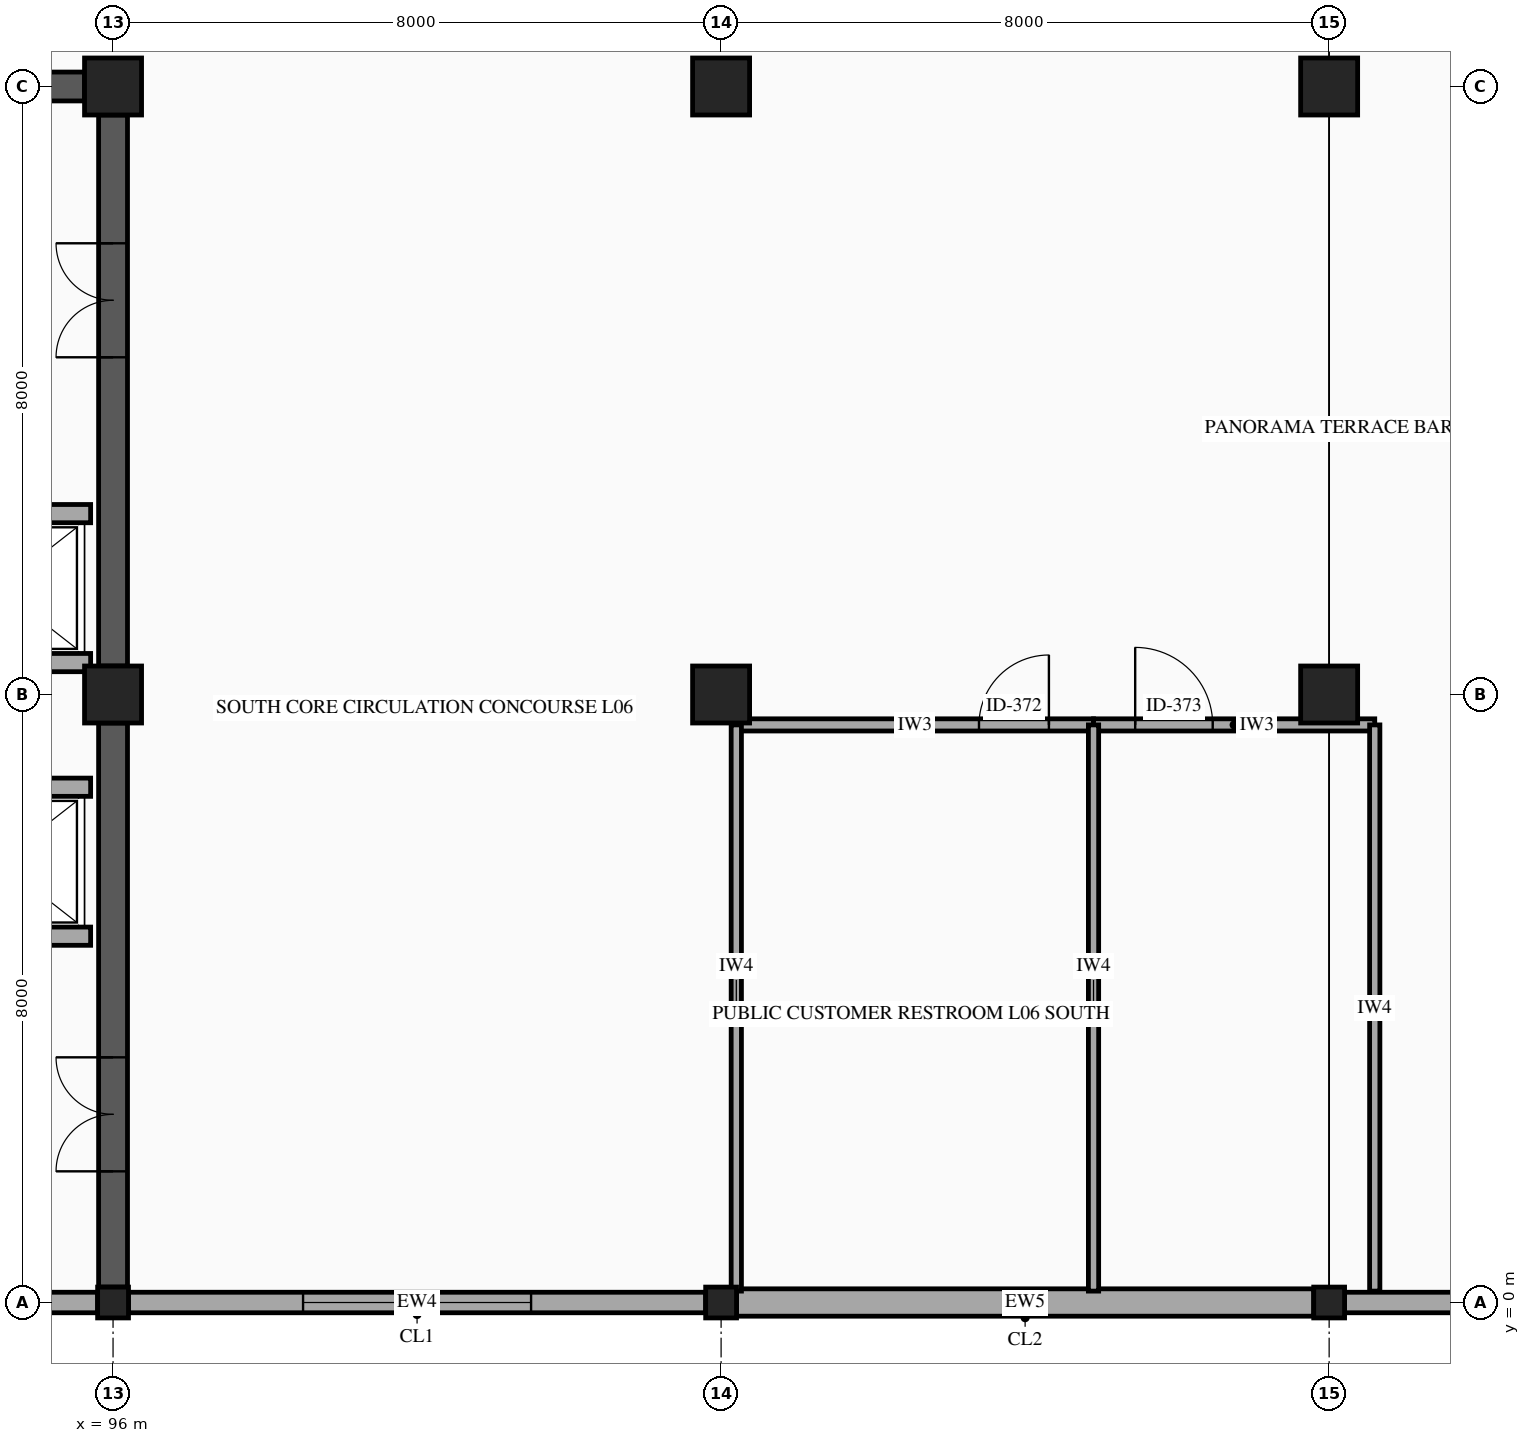
"""IFC4 building model, lengths in metres.
Left out: names, types, materials, properties, quantities, classifications, styles, units other than length and angle.
Written with IfcOpenShell. Run it as: python <this file> out.ifc"""

import sys

from ifc_helpers import new_model, si_unit, direction, frame, frame_2d, origin, origin_2d, place, context, subcontext, project, spatial, rectangle, hollow_rectangle, extrude, element, fill, save


model = new_model("IFC4")
c1 = context("Model", 3, precision=1e-05, world=origin(), true_north=direction((0.0, 1.0)))
c2 = subcontext(c1, "Body", "Model", "MODEL_VIEW")
j1 = project(units=[si_unit("LENGTHUNIT", "METRE"), si_unit("PLANEANGLEUNIT", "RADIAN")], contexts=[c1])
p1 = place(None, origin())
s1 = spatial("IfcSite", under=j1, at=p1, CompositionType="ELEMENT")
p2 = place(p1, origin())
s2 = spatial("IfcBuilding", under=s1, at=p2, CompositionType="ELEMENT")
p3 = place(p2, frame((0.0, 0.0, 28.4)))
s3 = spatial("IfcBuildingStorey", under=s2, at=p3, CompositionType="ELEMENT", Elevation=28.4)
p4 = place(p3, frame((96.0, 0.0, 0.0), z_axis=(0.0, 0.0, 1.0), x_axis=(1.0, 0.0, 0.0)))
e1 = element("IfcColumn", 1, at=p4, inside=s3, PredefinedType="COLUMN", context=c2, shape_type="SweptSolid", body=[
    extrude(hollow_rectangle(XDim=0.406, YDim=0.406, WallThickness=0.015, InnerFilletRadius=0.015, OuterFilletRadius=0.029, at=origin_2d()), origin(), (0.0, 0.0, 1.0), 4.5),
])
for number, where, z_axis, x_axis in (
    (2, (96.0, 8.0, 0.0), (0.0, 0.0, 1.0), (1.0, 0.0, 0.0)),
    (3, (96.0, 16.0, 0.0), (0.0, 0.0, 1.0), (1.0, 0.0, 0.0)),
):
    element("IfcColumn", number, at=place(p3, frame(where, z_axis=z_axis, x_axis=x_axis)), inside=s3, PredefinedType="COLUMN", context=c2, shape_type="SweptSolid", body=[
        extrude(rectangle(XDim=0.75, YDim=0.75, at=origin_2d()), origin(), (0.0, 0.0, 1.0), 4.5),
    ])
p5 = place(p3, frame((104.0, 0.0, 0.0), z_axis=(0.0, 0.0, 1.0), x_axis=(1.0, 0.0, 0.0)))
e4 = element("IfcColumn", 4, at=p5, inside=s3, PredefinedType="COLUMN", context=c2, shape_type="SweptSolid", body=[
    extrude(hollow_rectangle(XDim=0.406, YDim=0.406, WallThickness=0.015, InnerFilletRadius=0.015, OuterFilletRadius=0.029, at=origin_2d()), origin(), (0.0, 0.0, 1.0), 4.5),
])
for number, where, z_axis, x_axis in (
    (5, (104.0, 8.0, 0.0), (0.0, 0.0, 1.0), (1.0, 0.0, 0.0)),
    (6, (104.0, 16.0, 0.0), (0.0, 0.0, 1.0), (1.0, 0.0, 0.0)),
):
    element("IfcColumn", number, at=place(p3, frame(where, z_axis=z_axis, x_axis=x_axis)), inside=s3, PredefinedType="COLUMN", context=c2, shape_type="SweptSolid", body=[
        extrude(rectangle(XDim=0.75, YDim=0.75, at=origin_2d()), origin(), (0.0, 0.0, 1.0), 4.5),
    ])
p6 = place(p3, frame((112.0, 0.0, 0.0), z_axis=(0.0, 0.0, 1.0), x_axis=(1.0, 0.0, 0.0)))
e7 = element("IfcColumn", 7, at=p6, inside=s3, PredefinedType="COLUMN", context=c2, shape_type="SweptSolid", body=[
    extrude(hollow_rectangle(XDim=0.406, YDim=0.406, WallThickness=0.015, InnerFilletRadius=0.015, OuterFilletRadius=0.029, at=origin_2d()), origin(), (0.0, 0.0, 1.0), 4.5),
])
for number, where, z_axis, x_axis in (
    (8, (112.0, 8.0, 0.0), (0.0, 0.0, 1.0), (1.0, 0.0, 0.0)),
    (9, (112.0, 16.0, 0.0), (0.0, 0.0, 1.0), (1.0, 0.0, 0.0)),
):
    element("IfcColumn", number, at=place(p3, frame(where, z_axis=z_axis, x_axis=x_axis)), inside=s3, PredefinedType="COLUMN", context=c2, shape_type="SweptSolid", body=[
        extrude(rectangle(XDim=0.75, YDim=0.75, at=origin_2d()), origin(), (0.0, 0.0, 1.0), 4.5),
    ])
p7 = place(p3, frame((119.797, 0.0, 0.0), z_axis=(0.0, 0.0, 1.0), x_axis=(-1.0, 0.0, 0.0)))
e10 = element("IfcWall", 10, at=p7, inside=s3, PredefinedType="STANDARD", context=c2, shape_type="SweptSolid", body=[
    extrude(rectangle(XDim=7.594, YDim=0.27, at=frame_2d((3.797, 0.0))), origin(), (0.0, 0.0, 1.0), 3.48),
])
p8 = place(p7, frame((2.347, 0.0, 0.8)))
e11 = element("IfcOpeningElement", 11, at=p8, cuts=e10, PredefinedType="OPENING", context=c2, shape_type="SweptSolid", body=[
    extrude(rectangle(XDim=2.9, YDim=2.1, at=frame_2d((1.45, 1.05))), frame((0.0, 0.145, 0.0), z_axis=(0.0, -1.0, 0.0), x_axis=(1.0, 0.0, 0.0)), (0.0, 0.0, 1.0), 0.29),
])
p9 = place(p3, frame((111.797, 0.0, 0.0), z_axis=(0.0, 0.0, 1.0), x_axis=(-1.0, 0.0, 0.0)))
e12 = element("IfcWall", 12, at=p9, inside=s3, PredefinedType="SOLIDWALL", context=c2, shape_type="SweptSolid", body=[
    extrude(rectangle(XDim=7.594, YDim=0.36, at=frame_2d((3.797, 0.0))), origin(), (0.0, 0.0, 1.0), 3.48),
])
p10 = place(p3, frame((103.797, 0.0, 0.0), z_axis=(0.0, 0.0, 1.0), x_axis=(-1.0, 0.0, 0.0)))
e13 = element("IfcWall", 13, at=p10, inside=s3, PredefinedType="STANDARD", context=c2, shape_type="SweptSolid", body=[
    extrude(rectangle(XDim=7.594, YDim=0.27, at=frame_2d((3.797, 0.0))), origin(), (0.0, 0.0, 1.0), 3.48),
])
p11 = place(p10, frame((2.297, 0.0, 0.8)))
e14 = element("IfcOpeningElement", 14, at=p11, cuts=e13, PredefinedType="OPENING", context=c2, shape_type="SweptSolid", body=[
    extrude(rectangle(XDim=3.0, YDim=1.6, at=frame_2d((1.5, 0.8))), frame((0.0, 0.145, 0.0), z_axis=(0.0, -1.0, 0.0), x_axis=(1.0, 0.0, 0.0)), (0.0, 0.0, 1.0), 0.29),
])
p12 = place(p3, frame((95.797, 0.0, 0.0), z_axis=(0.0, 0.0, 1.0), x_axis=(-1.0, 0.0, 0.0)))
e15 = element("IfcWall", 15, at=p12, inside=s3, PredefinedType="STANDARD", context=c2, shape_type="SweptSolid", body=[
    extrude(rectangle(XDim=7.594, YDim=0.27, at=frame_2d((3.797, 0.0))), origin(), (0.0, 0.0, 1.0), 3.48),
])
p13 = place(p3, frame((88.375, 16.0, 0.0), z_axis=(0.0, 0.0, 1.0), x_axis=(1.0, 0.0, 0.0)))
e16 = element("IfcWall", 16, at=p13, inside=s3, PredefinedType="SHEAR", context=c2, shape_type="SweptSolid", body=[
    extrude(rectangle(XDim=7.25, YDim=0.38, at=frame_2d((3.625, 0.0))), origin(), (0.0, 0.0, 1.0), 4.28),
])
p14 = place(p13, frame((2.875, 0.0, 0.0)))
e17 = element("IfcOpeningElement", 17, at=p14, cuts=e16, PredefinedType="OPENING", context=c2, shape_type="SweptSolid", body=[
    extrude(rectangle(XDim=1.5, YDim=2.15, at=frame_2d((0.75, 1.075))), frame((0.0, 0.2, 0.0), z_axis=(0.0, -1.0, 0.0), x_axis=(1.0, 0.0, 0.0)), (0.0, 0.0, 1.0), 0.4),
])
p15 = place(p3, frame((96.0, 0.203, 0.0), z_axis=(0.0, 0.0, 1.0), x_axis=(0.0, 1.0, 0.0)))
e18 = element("IfcWall", 18, at=p15, inside=s3, PredefinedType="SHEAR", context=c2, shape_type="SweptSolid", body=[
    extrude(rectangle(XDim=7.422, YDim=0.38, at=frame_2d((3.711, 0.0))), origin(), (0.0, 0.0, 1.0), 4.28),
])
p16 = place(p15, frame((1.523, 0.0, 0.0)))
e19 = element("IfcOpeningElement", 19, at=p16, cuts=e18, PredefinedType="OPENING", context=c2, shape_type="SweptSolid", body=[
    extrude(rectangle(XDim=1.5, YDim=2.15, at=frame_2d((0.75, 1.075))), frame((0.0, 0.2, 0.0), z_axis=(0.0, -1.0, 0.0), x_axis=(1.0, 0.0, 0.0)), (0.0, 0.0, 1.0), 0.4),
])
p17 = place(p3, frame((96.0, 8.375, 0.0), z_axis=(0.0, 0.0, 1.0), x_axis=(0.0, 1.0, 0.0)))
e20 = element("IfcWall", 20, at=p17, inside=s3, PredefinedType="SHEAR", context=c2, shape_type="SweptSolid", body=[
    extrude(rectangle(XDim=7.25, YDim=0.38, at=frame_2d((3.625, 0.0))), origin(), (0.0, 0.0, 1.0), 4.28),
])
p18 = place(p17, frame((4.062, 0.0, 0.0)))
e21 = element("IfcOpeningElement", 21, at=p18, cuts=e20, PredefinedType="OPENING", context=c2, shape_type="SweptSolid", body=[
    extrude(rectangle(XDim=1.5, YDim=2.15, at=frame_2d((0.75, 1.075))), frame((0.0, 0.2, 0.0), z_axis=(0.0, -1.0, 0.0), x_axis=(1.0, 0.0, 0.0)), (0.0, 0.0, 1.0), 0.4),
])
p19 = place(p3, frame((93.295, 6.78, 0.0), z_axis=(0.0, 0.0, 1.0), x_axis=(1.0, 0.0, 0.0)))
e22 = element("IfcWall", 22, at=p19, inside=s3, PredefinedType="PARTITIONING", context=c2, shape_type="SweptSolid", body=[
    extrude(rectangle(XDim=2.41, YDim=0.24, at=frame_2d((1.205, 0.0))), origin(), (0.0, 0.0, 1.0), 4.28),
])
p20 = place(p19, frame((0.655, 0.0, 0.0)))
e23 = element("IfcOpeningElement", 23, at=p20, cuts=e22, PredefinedType="OPENING", context=c2, shape_type="SweptSolid", body=[
    extrude(rectangle(XDim=1.1, YDim=2.15, at=frame_2d((0.55, 1.075))), frame((0.0, 0.13, 0.0), z_axis=(0.0, -1.0, 0.0), x_axis=(1.0, 0.0, 0.0)), (0.0, 0.0, 1.0), 0.26),
])
p21 = place(p3, frame((93.295, 4.82, 0.0), z_axis=(0.0, 0.0, 1.0), x_axis=(1.0, 0.0, 0.0)))
e24 = element("IfcWall", 24, at=p21, inside=s3, PredefinedType="PARTITIONING", context=c2, shape_type="SweptSolid", body=[
    extrude(rectangle(XDim=2.41, YDim=0.24, at=frame_2d((1.205, 0.0))), origin(), (0.0, 0.0, 1.0), 4.28),
])
p22 = place(p3, frame((93.295, 10.38, 0.0), z_axis=(0.0, 0.0, 1.0), x_axis=(1.0, 0.0, 0.0)))
e25 = element("IfcWall", 25, at=p22, inside=s3, PredefinedType="PARTITIONING", context=c2, shape_type="SweptSolid", body=[
    extrude(rectangle(XDim=2.41, YDim=0.24, at=frame_2d((1.205, 0.0))), origin(), (0.0, 0.0, 1.0), 4.28),
])
p23 = place(p22, frame((0.655, 0.0, 0.0)))
e26 = element("IfcOpeningElement", 26, at=p23, cuts=e25, PredefinedType="OPENING", context=c2, shape_type="SweptSolid", body=[
    extrude(rectangle(XDim=1.1, YDim=2.15, at=frame_2d((0.55, 1.075))), frame((0.0, 0.13, 0.0), z_axis=(0.0, -1.0, 0.0), x_axis=(1.0, 0.0, 0.0)), (0.0, 0.0, 1.0), 0.26),
])
p24 = place(p3, frame((93.295, 8.42, 0.0), z_axis=(0.0, 0.0, 1.0), x_axis=(1.0, 0.0, 0.0)))
e27 = element("IfcWall", 27, at=p24, inside=s3, PredefinedType="PARTITIONING", context=c2, shape_type="SweptSolid", body=[
    extrude(rectangle(XDim=2.41, YDim=0.24, at=frame_2d((1.205, 0.0))), origin(), (0.0, 0.0, 1.0), 4.28),
])
p25 = place(p3, frame((104.2, 7.6, 0.0), z_axis=(0.0, 0.0, 1.0), x_axis=(1.0, 0.0, 0.0)))
e28 = element("IfcWall", 28, at=p25, inside=s3, PredefinedType="PARTITIONING", context=c2, shape_type="SweptSolid", body=[
    extrude(rectangle(XDim=4.7, YDim=0.16, at=frame_2d((2.35, 0.0))), origin(), (0.0, 0.0, 1.0), 3.48),
])
p26 = place(p25, frame((3.193, 0.0, 0.0)))
e29 = element("IfcOpeningElement", 29, at=p26, cuts=e28, PredefinedType="OPENING", context=c2, shape_type="SweptSolid", body=[
    extrude(rectangle(XDim=0.92, YDim=2.1, at=frame_2d((0.46, 1.05))), frame((0.0, 0.09, 0.0), z_axis=(0.0, -1.0, 0.0), x_axis=(1.0, 0.0, 0.0)), (0.0, 0.0, 1.0), 0.18),
])
p27 = place(p3, frame((108.9, 7.6, 0.0), z_axis=(0.0, 0.0, 1.0), x_axis=(1.0, 0.0, 0.0)))
e30 = element("IfcWall", 30, at=p27, inside=s3, PredefinedType="PARTITIONING", context=c2, shape_type="SweptSolid", body=[
    extrude(rectangle(XDim=3.7, YDim=0.16, at=frame_2d((1.85, 0.0))), origin(), (0.0, 0.0, 1.0), 3.48),
])
p28 = place(p27, frame((0.548, 0.0, 0.0)))
e31 = element("IfcOpeningElement", 31, at=p28, cuts=e30, PredefinedType="OPENING", context=c2, shape_type="SweptSolid", body=[
    extrude(rectangle(XDim=1.02, YDim=2.1, at=frame_2d((0.51, 1.05))), frame((0.0, 0.09, 0.0), z_axis=(0.0, -1.0, 0.0), x_axis=(1.0, 0.0, 0.0)), (0.0, 0.0, 1.0), 0.18),
])
for number, where, z_axis, x_axis in (
    (32, (104.2, 0.15, 0.0), (0.0, 0.0, 1.0), (0.0, 1.0, 0.0)),
    (33, (108.9, 0.15, 0.0), (0.0, 0.0, 1.0), (0.0, 1.0, 0.0)),
    (34, (112.6, 0.15, 0.0), (0.0, 0.0, 1.0), (0.0, 1.0, 0.0)),
):
    element("IfcWall", number, at=place(p3, frame(where, z_axis=z_axis, x_axis=x_axis)), inside=s3, PredefinedType="PARTITIONING", context=c2, shape_type="SweptSolid", body=[
        extrude(rectangle(XDim=7.45, YDim=0.135, at=frame_2d((3.725, 0.0))), origin(), (0.0, 0.0, 1.0), 3.48),
    ])
p29 = place(p11, origin())
e35 = element("IfcWindow", 35, at=p29, inside=s3, PartitioningType="TRIPLE_PANEL_VERTICAL", PredefinedType="WINDOW", context=c2, shape_type="SweptSolid", body=[
    extrude(rectangle(XDim=3.0, YDim=1.6, at=frame_2d((1.5, 0.8))), frame((0.0, 0.03, 0.0), z_axis=(0.0, -1.0, 0.0), x_axis=(1.0, 0.0, 0.0)), (0.0, 0.0, 1.0), 0.06),
])
fill(e14, e35)
p30 = place(p16, origin())
e36 = element("IfcDoor", 36, at=p30, inside=s3, OperationType="DOUBLE_DOOR_SINGLE_SWING", PredefinedType="DOOR", context=c2, shape_type="SweptSolid", body=[
    extrude(rectangle(XDim=1.5, YDim=2.15, at=frame_2d((0.75, 1.075))), frame((0.0, 0.025, 0.0), z_axis=(0.0, -1.0, 0.0), x_axis=(1.0, 0.0, 0.0)), (0.0, 0.0, 1.0), 0.05),
])
fill(e19, e36)
p31 = place(p18, origin())
e37 = element("IfcDoor", 37, at=p31, inside=s3, OperationType="DOUBLE_DOOR_SINGLE_SWING", PredefinedType="DOOR", context=c2, shape_type="SweptSolid", body=[
    extrude(rectangle(XDim=1.5, YDim=2.15, at=frame_2d((0.75, 1.075))), frame((0.0, 0.025, 0.0), z_axis=(0.0, -1.0, 0.0), x_axis=(1.0, 0.0, 0.0)), (0.0, 0.0, 1.0), 0.05),
])
fill(e21, e37)
p32 = place(p26, origin())
e38 = element("IfcDoor", 38, at=p32, inside=s3, OperationType="SINGLE_SWING_RIGHT", PredefinedType="DOOR", context=c2, shape_type="SweptSolid", body=[
    extrude(rectangle(XDim=0.92, YDim=2.1, at=frame_2d((0.46, 1.05))), frame((0.0, 0.025, 0.0), z_axis=(0.0, -1.0, 0.0), x_axis=(1.0, 0.0, 0.0)), (0.0, 0.0, 1.0), 0.05),
])
fill(e29, e38)
p33 = place(p28, origin())
e39 = element("IfcDoor", 39, at=p33, inside=s3, OperationType="SINGLE_SWING_LEFT", PredefinedType="DOOR", context=c2, shape_type="SweptSolid", body=[
    extrude(rectangle(XDim=1.02, YDim=2.1, at=frame_2d((0.51, 1.05))), frame((0.0, 0.025, 0.0), z_axis=(0.0, -1.0, 0.0), x_axis=(1.0, 0.0, 0.0)), (0.0, 0.0, 1.0), 0.05),
])
fill(e31, e39)
save(model, sys.argv[1])
